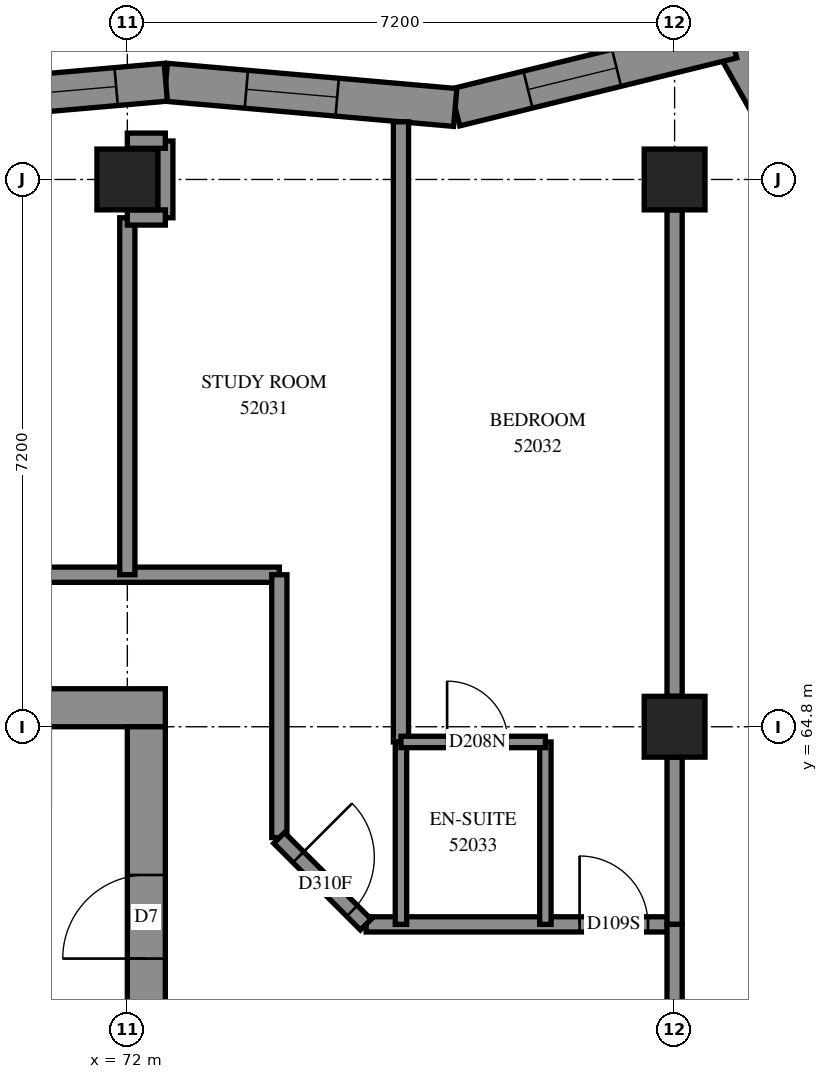
"""IFC4 building model, lengths in metres.
Left out: names, types, materials, properties, quantities, classifications, styles, units other than length and angle.
Written with IfcOpenShell. Run it as: python <this file> out.ifc"""

import sys

from ifc_helpers import new_model, si_unit, direction, frame, frame_2d, origin, origin_2d, place, context, subcontext, project, spatial, polyline, rectangle, outline, extrude, element, fill, save


model = new_model("IFC4")
c1 = context("Model", 3, precision=1e-05, world=origin(), true_north=direction((0.0, 1.0)))
c2 = subcontext(c1, "Body", "Model", "MODEL_VIEW")
j1 = project(units=[si_unit("LENGTHUNIT", "METRE"), si_unit("PLANEANGLEUNIT", "RADIAN")], contexts=[c1])
p1 = place(None, origin())
s1 = spatial("IfcSite", under=j1, at=p1, CompositionType="ELEMENT")
p2 = place(p1, origin())
s2 = spatial("IfcBuilding", under=s1, at=p2, CompositionType="ELEMENT")
p3 = place(p2, frame((0.0, 0.0, 193.0)))
s3 = spatial("IfcBuildingStorey", under=s2, at=p3, CompositionType="ELEMENT", Elevation=193.0)
for number, where, z_axis, x_axis in (
    (1, (72.0, 72.0, 0.0), (0.0, 0.0, 1.0), (1.0, 0.0, 0.0)),
    (2, (79.2, 64.8, 0.0), (0.0, 0.0, 1.0), (1.0, 0.0, 0.0)),
    (3, (79.2, 72.0, 0.0), (0.0, 0.0, 1.0), (1.0, 0.0, 0.0)),
):
    element("IfcColumn", number, at=place(p3, frame(where, z_axis=z_axis, x_axis=x_axis)), inside=s3, PredefinedType="COLUMN", context=c2, shape_type="SweptSolid", body=[
        extrude(rectangle(XDim=0.8, YDim=0.8, at=origin_2d()), origin(), (0.0, 0.0, 1.0), 3.1),
    ])
p4 = place(p3, frame((57.1, 65.05, -0.3), z_axis=(0.0, 0.0, 1.0), x_axis=(1.0, 0.0, 0.0)))
e4 = element("IfcWall", 4, at=p4, inside=s3, PredefinedType="SHEAR", context=c2, shape_type="SweptSolid", body=[
    extrude(rectangle(XDim=15.4, YDim=0.5, at=frame_2d((7.7, 0.0))), origin(), (0.0, 0.0, 1.0), 2.7),
])
p5 = place(p4, frame((10.5, 0.0, 0.3)))
e5 = element("IfcOpeningElement", 5, at=p5, cuts=e4, PredefinedType="OPENING", context=c2, shape_type="SweptSolid", body=[
    extrude(rectangle(XDim=0.8, YDim=2.1, at=frame_2d((0.4, 1.05))), frame((0.0, 0.26, 0.0), z_axis=(0.0, -1.0, 0.0), x_axis=(1.0, 0.0, 0.0)), (0.0, 0.0, 1.0), 0.52),
])
p6 = place(p3, frame((72.25, 50.4, -0.3), z_axis=(0.0, 0.0, 1.0), x_axis=(0.0, 1.0, 0.0)))
e6 = element("IfcWall", 6, at=p6, inside=s3, PredefinedType="SHEAR", context=c2, shape_type="SweptSolid", body=[
    extrude(rectangle(XDim=14.4, YDim=0.5, at=frame_2d((7.2, 0.0))), origin(), (0.0, 0.0, 1.0), 2.7),
])
p7 = place(p6, frame((4.55, 0.0, 0.3)))
e7 = element("IfcOpeningElement", 7, at=p7, cuts=e6, PredefinedType="OPENING", context=c2, shape_type="SweptSolid", body=[
    extrude(rectangle(XDim=1.1, YDim=2.1, at=frame_2d((0.55, 1.05))), frame((0.0, 0.26, 0.0), z_axis=(0.0, -1.0, 0.0), x_axis=(1.0, 0.0, 0.0)), (0.0, 0.0, 1.0), 0.52),
])
p8 = place(p6, frame((11.35, 0.0, 0.3)))
e8 = element("IfcOpeningElement", 8, at=p8, cuts=e6, PredefinedType="OPENING", context=c2, shape_type="SweptSolid", body=[
    extrude(rectangle(XDim=1.1, YDim=2.1, at=frame_2d((0.55, 1.05))), frame((0.0, 0.26, 0.0), z_axis=(0.0, -1.0, 0.0), x_axis=(1.0, 0.0, 0.0)), (0.0, 0.0, 1.0), 0.52),
])
p9 = place(p3, frame((81.583, 70.955, 0.0), z_axis=(0.0, 0.0, 1.0), x_axis=(-0.4907169028, 0.8713190697, 0.0)))
e9 = element("IfcWall", 9, at=p9, inside=s3, PredefinedType="SOLIDWALL", context=c2, shape_type="SweptSolid", body=[
    extrude(outline(polyline([(0.047, -0.25), (3.503, -0.25), (3.123, 0.25), (-0.047, 0.25), (0.047, -0.25)])), origin(), (0.0, 0.0, 1.0), 3.1),
])
p10 = place(p9, frame((0.758, 0.0, 0.45)))
e10 = element("IfcOpeningElement", 10, at=p10, cuts=e9, PredefinedType="OPENING", context=c2, shape_type="SweptSolid", body=[
    extrude(rectangle(XDim=1.2, YDim=2.5, at=frame_2d((0.6, 1.25))), frame((0.0, 0.26, 0.0), z_axis=(0.0, -1.0, 0.0), x_axis=(1.0, 0.0, 0.0)), (0.0, 0.0, 1.0), 0.52),
])
p11 = place(p3, frame((79.958, 73.842, 0.0), z_axis=(0.0, 0.0, 1.0), x_axis=(-0.9711637083, -0.2384136147, 0.0)))
e11 = element("IfcWall", 11, at=p11, inside=s3, PredefinedType="SOLIDWALL", context=c2, shape_type="SweptSolid", body=[
    extrude(outline(polyline([(-0.19, -0.25), (3.711, -0.25), (3.794, 0.25), (0.19, 0.25), (-0.19, -0.25)])), origin(), (0.0, 0.0, 1.0), 3.1),
])
p12 = place(p11, frame((1.566, 0.0, 0.45)))
e12 = element("IfcOpeningElement", 12, at=p12, cuts=e11, PredefinedType="OPENING", context=c2, shape_type="SweptSolid", body=[
    extrude(rectangle(XDim=1.2, YDim=2.5, at=frame_2d((0.6, 1.25))), frame((0.0, 0.26, 0.0), z_axis=(0.0, -1.0, 0.0), x_axis=(1.0, 0.0, 0.0)), (0.0, 0.0, 1.0), 0.52),
])
p13 = place(p3, frame((76.314, 72.947, 0.0), z_axis=(0.0, 0.0, 1.0), x_axis=(-0.9962271263, 0.0867842891, 0.0)))
e13 = element("IfcWall", 13, at=p13, inside=s3, PredefinedType="SOLIDWALL", context=c2, shape_type="SweptSolid", body=[
    extrude(outline(polyline([(0.041, -0.25), (3.844, -0.25), (3.8, 0.25), (-0.041, 0.25), (0.041, -0.25)])), origin(), (0.0, 0.0, 1.0), 3.1),
])
p14 = place(p13, frame((1.558, 0.0, 0.45)))
e14 = element("IfcOpeningElement", 14, at=p14, cuts=e13, PredefinedType="OPENING", context=c2, shape_type="SweptSolid", body=[
    extrude(rectangle(XDim=1.2, YDim=2.5, at=frame_2d((0.6, 1.25))), frame((0.0, 0.26, 0.0), z_axis=(0.0, -1.0, 0.0), x_axis=(1.0, 0.0, 0.0)), (0.0, 0.0, 1.0), 0.52),
])
p15 = place(p3, frame((72.506, 73.279, 0.0), z_axis=(0.0, 0.0, 1.0), x_axis=(-0.9962273538, -0.0867816769, 0.0)))
e15 = element("IfcWall", 15, at=p15, inside=s3, PredefinedType="SOLIDWALL", context=c2, shape_type="SweptSolid", body=[
    extrude(outline(polyline([(-0.022, -0.25), (3.781, -0.25), (3.824, 0.25), (0.022, 0.25), (-0.022, -0.25)])), origin(), (0.0, 0.0, 1.0), 3.1),
])
p16 = place(p15, frame((0.655, 0.0, 0.45)))
e16 = element("IfcOpeningElement", 16, at=p16, cuts=e15, PredefinedType="OPENING", context=c2, shape_type="SweptSolid", body=[
    extrude(rectangle(XDim=1.3, YDim=2.5, at=frame_2d((0.65, 1.25))), frame((0.0, 0.26, 0.0), z_axis=(0.0, -1.0, 0.0), x_axis=(1.0, 0.0, 0.0)), (0.0, 0.0, 1.0), 0.52),
])
p17 = place(p15, frame((2.155, 0.0, 0.45)))
e17 = element("IfcOpeningElement", 17, at=p17, cuts=e15, PredefinedType="OPENING", context=c2, shape_type="SweptSolid", body=[
    extrude(rectangle(XDim=1.3, YDim=2.5, at=frame_2d((0.65, 1.25))), frame((0.0, 0.26, 0.0), z_axis=(0.0, -1.0, 0.0), x_axis=(1.0, 0.0, 0.0)), (0.0, 0.0, 1.0), 0.52),
])
p18 = place(p3, frame((55.6, 66.8, 0.0), z_axis=(0.0, 0.0, 1.0), x_axis=(1.0, 0.0, 0.0)))
e18 = element("IfcWall", 18, at=p18, inside=s3, PredefinedType="PARTITIONING", context=c2, shape_type="SweptSolid", body=[
    extrude(rectangle(XDim=18.4, YDim=0.2, at=frame_2d((9.2, 0.0))), origin(), (0.0, 0.0, 1.0), 3.1),
])
p19 = place(p18, frame((5.886, 0.0, 0.0)))
e19 = element("IfcOpeningElement", 19, at=p19, cuts=e18, PredefinedType="OPENING", context=c2, shape_type="SweptSolid", body=[
    extrude(rectangle(XDim=1.0, YDim=2.1, at=frame_2d((0.5, 1.05))), frame((0.0, 0.11, 0.0), z_axis=(0.0, -1.0, 0.0), x_axis=(1.0, 0.0, 0.0)), (0.0, 0.0, 1.0), 0.22),
])
p20 = place(p18, frame((13.389, 0.0, 0.0)))
e20 = element("IfcOpeningElement", 20, at=p20, cuts=e18, PredefinedType="OPENING", context=c2, shape_type="SweptSolid", body=[
    extrude(rectangle(XDim=1.0, YDim=2.1, at=frame_2d((0.5, 1.05))), frame((0.0, 0.11, 0.0), z_axis=(0.0, -1.0, 0.0), x_axis=(1.0, 0.0, 0.0)), (0.0, 0.0, 1.0), 0.22),
])
p21 = place(p3, frame((75.6, 64.6, 0.0), z_axis=(0.0, 0.0, 1.0), x_axis=(0.0, 1.0, 0.0)))
e21 = element("IfcWall", 21, at=p21, inside=s3, PredefinedType="PARTITIONING", context=c2, shape_type="SweptSolid", body=[
    extrude(rectangle(XDim=8.159, YDim=0.2, at=frame_2d((4.079, 0.0))), origin(), (0.0, 0.0, 1.0), 3.1),
])
p22 = place(p3, frame((79.2, 65.2, 0.0), z_axis=(0.0, 0.0, 1.0), x_axis=(0.0, 1.0, 0.0)))
e22 = element("IfcWall", 22, at=p22, inside=s3, PredefinedType="PARTITIONING", context=c2, shape_type="SweptSolid", body=[
    extrude(rectangle(XDim=6.4, YDim=0.2, at=frame_2d((3.2, 0.0))), origin(), (0.0, 0.0, 1.0), 3.1),
])
p23 = place(p3, frame((72.0, 66.8, 0.0), z_axis=(0.0, 0.0, 1.0), x_axis=(0.0, 1.0, 0.0)))
e23 = element("IfcWall", 23, at=p23, inside=s3, PredefinedType="PARTITIONING", context=c2, shape_type="SweptSolid", body=[
    extrude(rectangle(XDim=4.696, YDim=0.2, at=frame_2d((2.348, 0.0))), origin(), (0.0, 0.0, 1.0), 3.1),
])
p24 = place(p3, frame((75.142, 62.2, 0.0), z_axis=(0.0, 0.0, 1.0), x_axis=(1.0, 0.0, 0.0)))
e24 = element("IfcWall", 24, at=p24, inside=s3, PredefinedType="PARTITIONING", context=c2, shape_type="SweptSolid", body=[
    extrude(rectangle(XDim=4.058, YDim=0.2, at=frame_2d((2.029, 0.0))), origin(), (0.0, 0.0, 1.0), 3.1),
])
p25 = place(p24, frame((2.808, 0.0, 0.0)))
e25 = element("IfcOpeningElement", 25, at=p25, cuts=e24, PredefinedType="OPENING", context=c2, shape_type="SweptSolid", body=[
    extrude(rectangle(XDim=0.9, YDim=2.1, at=frame_2d((0.45, 1.05))), frame((0.0, 0.11, 0.0), z_axis=(0.0, -1.0, 0.0), x_axis=(1.0, 0.0, 0.0)), (0.0, 0.0, 1.0), 0.22),
])
p26 = place(p3, frame((74.0, 63.342, 0.0), z_axis=(0.0, 0.0, 1.0), x_axis=(0.0, 1.0, 0.0)))
e26 = element("IfcWall", 26, at=p26, inside=s3, PredefinedType="PARTITIONING", context=c2, shape_type="SweptSolid", body=[
    extrude(rectangle(XDim=3.458, YDim=0.2, at=frame_2d((1.729, 0.0))), origin(), (0.0, 0.0, 1.0), 3.1),
])
for number, where, z_axis, x_axis in (
    (27, (75.6, 62.2, 0.0), (0.0, 0.0, 1.0), (0.0, 1.0, 0.0)),
    (28, (77.5, 62.2, 0.0), (0.0, 0.0, 1.0), (0.0, 1.0, 0.0)),
):
    element("IfcWall", number, at=place(p3, frame(where, z_axis=z_axis, x_axis=x_axis)), inside=s3, PredefinedType="PARTITIONING", context=c2, shape_type="SweptSolid", body=[
        extrude(rectangle(XDim=2.4, YDim=0.15, at=frame_2d((1.2, 0.0))), origin(), (0.0, 0.0, 1.0), 3.1),
    ])
p27 = place(p3, frame((79.2, 62.2, 0.0), z_axis=(0.0, 0.0, 1.0), x_axis=(0.0, 1.0, 0.0)))
e29 = element("IfcWall", 29, at=p27, inside=s3, PredefinedType="PARTITIONING", context=c2, shape_type="SweptSolid", body=[
    extrude(rectangle(XDim=2.2, YDim=0.2, at=frame_2d((1.1, 0.0))), origin(), (0.0, 0.0, 1.0), 3.1),
])
p28 = place(p3, frame((79.2, 60.2, 0.0), z_axis=(0.0, 0.0, 1.0), x_axis=(0.0, 1.0, 0.0)))
e30 = element("IfcWall", 30, at=p28, inside=s3, PredefinedType="PARTITIONING", context=c2, shape_type="SweptSolid", body=[
    extrude(rectangle(XDim=2.0, YDim=0.2, at=frame_2d((1.0, 0.0))), origin(), (0.0, 0.0, 1.0), 3.1),
])
p29 = place(p3, frame((75.6, 64.6, 0.0), z_axis=(0.0, 0.0, 1.0), x_axis=(1.0, 0.0, 0.0)))
e31 = element("IfcWall", 31, at=p29, inside=s3, PredefinedType="PARTITIONING", context=c2, shape_type="SweptSolid", body=[
    extrude(rectangle(XDim=1.9, YDim=0.15, at=frame_2d((0.95, 0.0))), origin(), (0.0, 0.0, 1.0), 3.1),
])
p30 = place(p29, frame((0.607, 0.0, 0.0)))
e32 = element("IfcOpeningElement", 32, at=p30, cuts=e31, PredefinedType="OPENING", context=c2, shape_type="SweptSolid", body=[
    extrude(rectangle(XDim=0.8, YDim=2.1, at=frame_2d((0.4, 1.05))), frame((0.0, 0.085, 0.0), z_axis=(0.0, -1.0, 0.0), x_axis=(1.0, 0.0, 0.0)), (0.0, 0.0, 1.0), 0.17),
])
p31 = place(p3, frame((73.997, 63.337, 0.0), z_axis=(0.0, 0.0, 1.0), x_axis=(0.7071067812, -0.7071067812, 0.0)))
e33 = element("IfcWall", 33, at=p31, inside=s3, PredefinedType="PARTITIONING", context=c2, shape_type="SweptSolid", body=[
    extrude(rectangle(XDim=1.612, YDim=0.2, at=frame_2d((0.806, 0.0))), origin(), (0.0, 0.0, 1.0), 3.1),
])
p32 = place(p31, frame((0.357, 0.0, 0.0)))
e34 = element("IfcOpeningElement", 34, at=p32, cuts=e33, PredefinedType="OPENING", context=c2, shape_type="SweptSolid", body=[
    extrude(rectangle(XDim=1.0, YDim=2.1, at=frame_2d((0.5, 1.05))), frame((0.0, 0.11, 0.0), z_axis=(0.0, -1.0, 0.0), x_axis=(1.0, 0.0, 0.0)), (0.0, 0.0, 1.0), 0.22),
])
p33 = place(p3, frame((72.5, 71.496, 0.0), z_axis=(0.0, 0.0, 1.0), x_axis=(0.0, 1.0, 0.0)))
e35 = element("IfcWall", 35, at=p33, inside=s3, PredefinedType="PARTITIONING", context=c2, shape_type="SweptSolid", body=[
    extrude(rectangle(XDim=1.01, YDim=0.2, at=frame_2d((0.505, 0.0))), origin(), (0.0, 0.0, 1.0), 3.1),
])
for number, where, z_axis, x_axis in (
    (36, (72.0, 72.51, 0.0), (0.0, 0.0, 1.0), (1.0, 0.0, 0.0)),
    (37, (72.0, 71.5, 0.0), (0.0, 0.0, 1.0), (1.0, 0.0, 0.0)),
):
    element("IfcWall", number, at=place(p3, frame(where, z_axis=z_axis, x_axis=x_axis)), inside=s3, PredefinedType="PARTITIONING", context=c2, shape_type="SweptSolid", body=[
        extrude(rectangle(XDim=0.5, YDim=0.2, at=frame_2d((0.25, 0.0))), origin(), (0.0, 0.0, 1.0), 3.1),
    ])
p34 = place(p12, origin())
e38 = element("IfcWindow", 38, at=p34, inside=s3, PartitioningType="SINGLE_PANEL", PredefinedType="WINDOW", context=c2, shape_type="SweptSolid", body=[
    extrude(rectangle(XDim=1.2, YDim=2.5, at=frame_2d((0.6, 1.25))), frame((0.0, 0.18, 0.0), z_axis=(0.0, -1.0, 0.0), x_axis=(1.0, 0.0, 0.0)), (0.0, 0.0, 1.0), 0.06),
])
fill(e12, e38)
p35 = place(p14, origin())
e39 = element("IfcWindow", 39, at=p35, inside=s3, PartitioningType="SINGLE_PANEL", PredefinedType="WINDOW", context=c2, shape_type="SweptSolid", body=[
    extrude(rectangle(XDim=1.2, YDim=2.5, at=frame_2d((0.6, 1.25))), frame((0.0, 0.18, 0.0), z_axis=(0.0, -1.0, 0.0), x_axis=(1.0, 0.0, 0.0)), (0.0, 0.0, 1.0), 0.06),
])
fill(e14, e39)
p36 = place(p16, origin())
e40 = element("IfcWindow", 40, at=p36, inside=s3, PartitioningType="SINGLE_PANEL", PredefinedType="WINDOW", context=c2, shape_type="SweptSolid", body=[
    extrude(rectangle(XDim=1.3, YDim=2.5, at=frame_2d((0.65, 1.25))), frame((0.0, 0.18, 0.0), z_axis=(0.0, -1.0, 0.0), x_axis=(1.0, 0.0, 0.0)), (0.0, 0.0, 1.0), 0.06),
])
fill(e16, e40)
p37 = place(p8, origin())
e41 = element("IfcDoor", 41, at=p37, inside=s3, OperationType="SINGLE_SWING_RIGHT", PredefinedType="DOOR", context=c2, shape_type="SweptSolid", body=[
    extrude(rectangle(XDim=1.1, YDim=2.1, at=frame_2d((0.55, 1.05))), frame((0.0, 0.025, 0.0), z_axis=(0.0, -1.0, 0.0), x_axis=(1.0, 0.0, 0.0)), (0.0, 0.0, 1.0), 0.05),
])
fill(e8, e41)
p38 = place(p32, origin())
e42 = element("IfcDoor", 42, at=p38, inside=s3, OperationType="SINGLE_SWING_RIGHT", PredefinedType="DOOR", context=c2, shape_type="SweptSolid", body=[
    extrude(rectangle(XDim=1.0, YDim=2.1, at=frame_2d((0.5, 1.05))), frame((0.0, 0.025, 0.0), z_axis=(0.0, -1.0, 0.0), x_axis=(1.0, 0.0, 0.0)), (0.0, 0.0, 1.0), 0.05),
])
fill(e34, e42)
p39 = place(p25, origin())
e43 = element("IfcDoor", 43, at=p39, inside=s3, OperationType="SINGLE_SWING_LEFT", PredefinedType="DOOR", context=c2, shape_type="SweptSolid", body=[
    extrude(rectangle(XDim=0.9, YDim=2.1, at=frame_2d((0.45, 1.05))), frame((0.0, 0.025, 0.0), z_axis=(0.0, -1.0, 0.0), x_axis=(1.0, 0.0, 0.0)), (0.0, 0.0, 1.0), 0.05),
])
fill(e25, e43)
p40 = place(p30, origin())
e44 = element("IfcDoor", 44, at=p40, inside=s3, OperationType="SINGLE_SWING_RIGHT", PredefinedType="DOOR", context=c2, shape_type="SweptSolid", body=[
    extrude(rectangle(XDim=0.8, YDim=2.1, at=frame_2d((0.4, 1.05))), frame((0.0, 0.025, 0.0), z_axis=(0.0, -1.0, 0.0), x_axis=(1.0, 0.0, 0.0)), (0.0, 0.0, 1.0), 0.05),
])
fill(e32, e44)
save(model, sys.argv[1])
